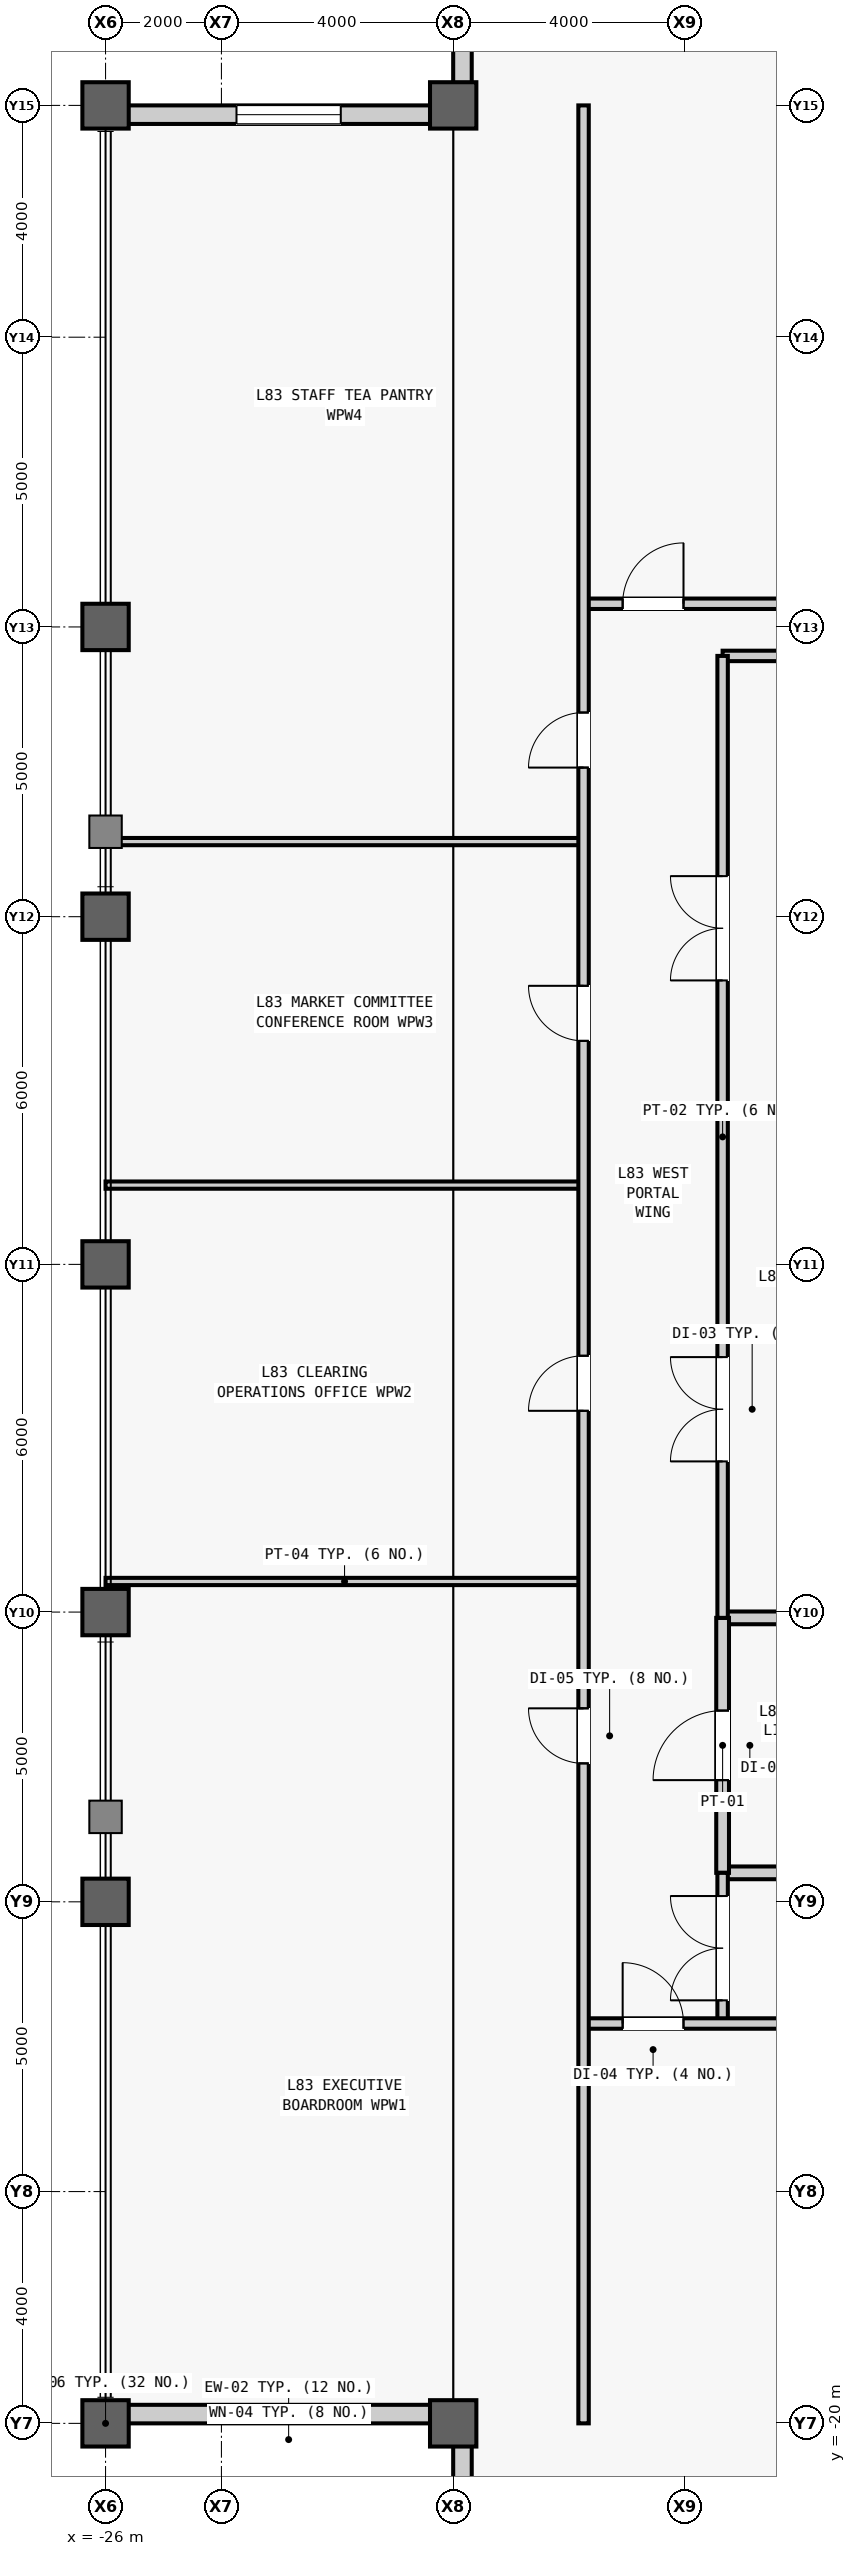
"""IFC4 building model, lengths in metres.
Left out: names, types, materials, properties, quantities, classifications, styles, units other than length and angle.
Written with IfcOpenShell. Run it as: python <this file> out.ifc"""

import sys

from ifc_helpers import new_model, si_unit, direction, frame, frame_2d, origin, origin_2d, place, context, subcontext, project, spatial, rectangle, hollow_rectangle, extrude, source, transform, mapped, element, fill, save


model = new_model("IFC4")
c1 = context("Model", 3, precision=1e-05, world=origin(), true_north=direction((0.0, 1.0)))
c2 = subcontext(c1, "Body", "Model", "MODEL_VIEW")
j1 = project(units=[si_unit("LENGTHUNIT", "METRE"), si_unit("PLANEANGLEUNIT", "RADIAN")], contexts=[c1])
p1 = place(None, origin())
s1 = spatial("IfcSite", under=j1, at=p1, CompositionType="ELEMENT")
p2 = place(p1, origin())
s2 = spatial("IfcBuilding", under=s1, at=p2, CompositionType="ELEMENT")
p3 = place(p2, frame((0.0, 0.0, 350.3)))
s3 = spatial("IfcBuildingStorey", under=s2, at=p3, CompositionType="ELEMENT", Elevation=350.3)
m1 = source(origin(), c2, "Body", "SweptSolid", [
    extrude(hollow_rectangle(XDim=0.8, YDim=0.8, WallThickness=0.045, at=origin_2d()), origin(), (0.0, 0.0, 1.0), 4.0),
])
for number, where, z_axis, x_axis in (
    (1, (-26.0, -20.0, 0.0), (0.0, 0.0, 1.0), (1.0, 0.0, 0.0)),
    (2, (-26.0, -11.0, 0.0), (0.0, 0.0, 1.0), (1.0, 0.0, 0.0)),
    (3, (-26.0, -6.0, 0.0), (0.0, 0.0, 1.0), (1.0, 0.0, 0.0)),
    (4, (-26.0, 0.0, 0.0), (0.0, 0.0, 1.0), (1.0, 0.0, 0.0)),
    (5, (-26.0, 6.0, 0.0), (0.0, 0.0, 1.0), (1.0, 0.0, 0.0)),
    (6, (-26.0, 11.0, 0.0), (0.0, 0.0, 1.0), (1.0, 0.0, 0.0)),
    (7, (-26.0, 20.0, 0.0), (0.0, 0.0, 1.0), (1.0, 0.0, 0.0)),
    (8, (-20.0, -20.0, 0.0), (0.0, 0.0, 1.0), (1.0, 0.0, 0.0)),
    (9, (-20.0, 20.0, 0.0), (0.0, 0.0, 1.0), (1.0, 0.0, 0.0)),
):
    element("IfcColumn", number, at=place(p3, frame(where, z_axis=z_axis, x_axis=x_axis)), inside=s3, PredefinedType="COLUMN", context=c2, shape_type="MappedRepresentation", body=[
        mapped(m1, transform((0.0, 0.0, 0.0), scale=1.0)),
    ])
m2 = source(origin(), c2, "Body", "SweptSolid", [
    extrude(rectangle(XDim=5.68, YDim=0.32, at=frame_2d((2.84, 0.0))), origin(), (0.0, 0.0, 1.0), 3.191),
])
p4 = place(p3, frame((-20.0, -19.84, 0.0), z_axis=(0.0, 0.0, 1.0), x_axis=(-1.0, 0.0, 0.0)))
e10 = element("IfcWall", 10, at=p4, inside=s3, PredefinedType="STANDARD", context=c2, shape_type="MappedRepresentation", body=[
    mapped(m2, transform((0.0, 0.0, 0.0), scale=1.0)),
])
m3 = source(origin(), c2, "Body", "SweptSolid", [
    extrude(rectangle(XDim=1.8, YDim=2.4, at=frame_2d((0.9, 1.2))), frame((0.0, 0.17, 0.0), z_axis=(0.0, -1.0, 0.0), x_axis=(1.0, 0.0, 0.0)), (0.0, 0.0, 1.0), 0.34),
])
p5 = place(p4, frame((1.94, 0.0, 0.5)))
e11 = element("IfcOpeningElement", 11, at=p5, cuts=e10, PredefinedType="OPENING", context=c2, shape_type="MappedRepresentation", body=[
    mapped(m3, transform((0.0, 0.0, 0.0), scale=1.0)),
])
p6 = place(p3, frame((-19.84, -25.68, 0.0), z_axis=(0.0, 0.0, 1.0), x_axis=(0.0, 1.0, 0.0)))
e12 = element("IfcWall", 12, at=p6, inside=s3, PredefinedType="STANDARD", context=c2, shape_type="MappedRepresentation", body=[
    mapped(m2, transform((0.0, 0.0, 0.0), scale=1.0)),
])
p7 = place(p6, frame((1.94, 0.0, 0.5)))
e13 = element("IfcOpeningElement", 13, at=p7, cuts=e12, PredefinedType="OPENING", context=c2, shape_type="MappedRepresentation", body=[
    mapped(m3, transform((0.0, 0.0, 0.0), scale=1.0)),
])
p8 = place(p3, frame((-19.84, 20.0, 0.0), z_axis=(0.0, 0.0, 1.0), x_axis=(0.0, 1.0, 0.0)))
e14 = element("IfcWall", 14, at=p8, inside=s3, PredefinedType="STANDARD", context=c2, shape_type="MappedRepresentation", body=[
    mapped(m2, transform((0.0, 0.0, 0.0), scale=1.0)),
])
p9 = place(p8, frame((1.94, 0.0, 0.5)))
e15 = element("IfcOpeningElement", 15, at=p9, cuts=e14, PredefinedType="OPENING", context=c2, shape_type="MappedRepresentation", body=[
    mapped(m3, transform((0.0, 0.0, 0.0), scale=1.0)),
])
p10 = place(p3, frame((-20.0, 19.84, 0.0), z_axis=(0.0, 0.0, 1.0), x_axis=(-1.0, 0.0, 0.0)))
e16 = element("IfcWall", 16, at=p10, inside=s3, PredefinedType="STANDARD", context=c2, shape_type="MappedRepresentation", body=[
    mapped(m2, transform((0.0, 0.0, 0.0), scale=1.0)),
])
p11 = place(p10, frame((1.94, 0.0, 0.5)))
e17 = element("IfcOpeningElement", 17, at=p11, cuts=e16, PredefinedType="OPENING", context=c2, shape_type="MappedRepresentation", body=[
    mapped(m3, transform((0.0, 0.0, 0.0), scale=1.0)),
])
m4 = source(origin(), c2, "Body", "SweptSolid", [
    extrude(rectangle(XDim=4.05, YDim=0.22, at=frame_2d((2.025, 0.0))), origin(), (0.0, 0.0, 1.0), 3.74),
])
p12 = place(p3, frame((-15.35, -10.5, 0.0), z_axis=(0.0, 0.0, 1.0), x_axis=(1.0, 0.0, 0.0)))
e18 = element("IfcWall", 18, at=p12, inside=s3, PredefinedType="PARTITIONING", context=c2, shape_type="MappedRepresentation", body=[
    mapped(m4, transform((0.0, 0.0, 0.0), scale=1.0)),
])
m5 = source(origin(), c2, "Body", "SweptSolid", [
    extrude(rectangle(XDim=4.05, YDim=0.22, at=frame_2d((2.025, 0.0))), origin(), (0.0, 0.0, 1.0), 3.124),
])
p13 = place(p3, frame((-15.35, -6.1, 0.0), z_axis=(0.0, 0.0, 1.0), x_axis=(1.0, 0.0, 0.0)))
e19 = element("IfcWall", 19, at=p13, inside=s3, PredefinedType="PARTITIONING", context=c2, shape_type="MappedRepresentation", body=[
    mapped(m5, transform((0.0, 0.0, 0.0), scale=1.0)),
])
m6 = source(origin(), c2, "Body", "SweptSolid", [
    extrude(rectangle(XDim=4.4, YDim=0.22, at=frame_2d((2.2, 0.0))), origin(), (0.0, 0.0, 1.0), 3.74),
])
p14 = place(p3, frame((-15.35, -10.5, 0.0), z_axis=(0.0, 0.0, 1.0), x_axis=(0.0, 1.0, 0.0)))
e20 = element("IfcWall", 20, at=p14, inside=s3, PredefinedType="PARTITIONING", context=c2, shape_type="MappedRepresentation", body=[
    mapped(m6, transform((0.0, 0.0, 0.0), scale=1.0)),
])
m7 = source(origin(), c2, "Body", "SweptSolid", [
    extrude(rectangle(XDim=1.2, YDim=2.2, at=frame_2d((0.6, 1.1))), frame((0.0, 0.12, 0.0), z_axis=(0.0, -1.0, 0.0), x_axis=(1.0, 0.0, 0.0)), (0.0, 0.0, 1.0), 0.24),
])
p15 = place(p14, frame((1.6, 0.0, 0.0)))
e21 = element("IfcOpeningElement", 21, at=p15, cuts=e20, PredefinedType="OPENING", context=c2, shape_type="MappedRepresentation", body=[
    mapped(m7, transform((0.0, 0.0, 0.0), scale=1.0)),
])
m8 = source(origin(), c2, "Body", "SweptSolid", [
    extrude(rectangle(XDim=4.05, YDim=0.18, at=frame_2d((2.025, 0.0))), origin(), (0.0, 0.0, 1.0), 3.74),
])
p16 = place(p3, frame((-15.35, 10.5, 0.0), z_axis=(0.0, 0.0, 1.0), x_axis=(1.0, 0.0, 0.0)))
e22 = element("IfcWall", 22, at=p16, inside=s3, PredefinedType="PARTITIONING", context=c2, shape_type="MappedRepresentation", body=[
    mapped(m8, transform((0.0, 0.0, 0.0), scale=1.0)),
])
m9 = source(origin(), c2, "Body", "SweptSolid", [
    extrude(rectangle(XDim=16.6, YDim=0.18, at=frame_2d((8.3, 0.0))), origin(), (0.0, 0.0, 1.0), 3.74),
])
p17 = place(p3, frame((-15.35, -6.1, 0.0), z_axis=(0.0, 0.0, 1.0), x_axis=(0.0, 1.0, 0.0)))
e23 = element("IfcWall", 23, at=p17, inside=s3, PredefinedType="PARTITIONING", context=c2, shape_type="MappedRepresentation", body=[
    mapped(m9, transform((0.0, 0.0, 0.0), scale=1.0)),
])
m10 = source(origin(), c2, "Body", "SweptSolid", [
    extrude(rectangle(XDim=1.8, YDim=2.25, at=frame_2d((0.9, 1.125))), frame((0.0, 0.1, 0.0), z_axis=(0.0, -1.0, 0.0), x_axis=(1.0, 0.0, 0.0)), (0.0, 0.0, 1.0), 0.2),
])
p18 = place(p17, frame((2.7, 0.0, 0.0)))
e24 = element("IfcOpeningElement", 24, at=p18, cuts=e23, PredefinedType="OPENING", context=c2, shape_type="MappedRepresentation", body=[
    mapped(m10, transform((0.0, 0.0, 0.0), scale=1.0)),
])
p19 = place(p17, frame((11.0, 0.0, 0.0)))
e25 = element("IfcOpeningElement", 25, at=p19, cuts=e23, PredefinedType="OPENING", context=c2, shape_type="MappedRepresentation", body=[
    mapped(m10, transform((0.0, 0.0, 0.0), scale=1.0)),
])
m11 = source(origin(), c2, "Body", "SweptSolid", [
    extrude(rectangle(XDim=2.6, YDim=0.18, at=frame_2d((1.3, 0.0))), origin(), (0.0, 0.0, 1.0), 3.74),
])
p20 = place(p3, frame((-15.35, -13.1, 0.0), z_axis=(0.0, 0.0, 1.0), x_axis=(0.0, 1.0, 0.0)))
e26 = element("IfcWall", 26, at=p20, inside=s3, PredefinedType="PARTITIONING", context=c2, shape_type="MappedRepresentation", body=[
    mapped(m11, transform((0.0, 0.0, 0.0), scale=1.0)),
])
p21 = place(p20, frame((0.4, 0.0, 0.0)))
e27 = element("IfcOpeningElement", 27, at=p21, cuts=e26, PredefinedType="OPENING", context=c2, shape_type="MappedRepresentation", body=[
    mapped(m10, transform((0.0, 0.0, 0.0), scale=1.0)),
])
m12 = source(origin(), c2, "Body", "SweptSolid", [
    extrude(rectangle(XDim=22.55, YDim=0.18, at=frame_2d((11.275, 0.0))), origin(), (0.0, 0.0, 1.0), 3.74),
])
p22 = place(p3, frame((-17.75, -13.1, 0.0), z_axis=(0.0, 0.0, 1.0), x_axis=(1.0, 0.0, 0.0)))
e28 = element("IfcWall", 28, at=p22, inside=s3, PredefinedType="PARTITIONING", context=c2, shape_type="MappedRepresentation", body=[
    mapped(m12, transform((0.0, 0.0, 0.0), scale=1.0)),
])
m13 = source(origin(), c2, "Body", "SweptSolid", [
    extrude(rectangle(XDim=1.05, YDim=2.2, at=frame_2d((0.525, 1.1))), frame((0.0, 0.1, 0.0), z_axis=(0.0, -1.0, 0.0), x_axis=(1.0, 0.0, 0.0)), (0.0, 0.0, 1.0), 0.2),
])
p23 = place(p22, frame((0.675, 0.0, 0.0)))
e29 = element("IfcOpeningElement", 29, at=p23, cuts=e28, PredefinedType="OPENING", context=c2, shape_type="MappedRepresentation", body=[
    mapped(m13, transform((0.0, 0.0, 0.0), scale=1.0)),
])
m14 = source(origin(), c2, "Body", "SweptSolid", [
    extrude(rectangle(XDim=12.7, YDim=0.18, at=frame_2d((6.35, 0.0))), origin(), (0.0, 0.0, 1.0), 2.79),
])
p24 = place(p3, frame((-17.75, 11.4, 0.0), z_axis=(0.0, 0.0, 1.0), x_axis=(1.0, 0.0, 0.0)))
e30 = element("IfcWall", 30, at=p24, inside=s3, PredefinedType="PARTITIONING", context=c2, shape_type="MappedRepresentation", body=[
    mapped(m14, transform((0.0, 0.0, 0.0), scale=1.0)),
])
p25 = place(p24, frame((0.675, 0.0, 0.0)))
e31 = element("IfcOpeningElement", 31, at=p25, cuts=e30, PredefinedType="OPENING", context=c2, shape_type="MappedRepresentation", body=[
    mapped(m13, transform((0.0, 0.0, 0.0), scale=1.0)),
])
m15 = source(origin(), c2, "Body", "SweptSolid", [
    extrude(rectangle(XDim=8.25, YDim=0.125, at=frame_2d((4.125, 0.0))), origin(), (0.0, 0.0, 1.0), 3.74),
])
for number, where, z_axis, x_axis in (
    (32, (-26.0, -5.472, 0.0), (0.0, 0.0, 1.0), (1.0, 0.0, 0.0)),
    (33, (-26.0, 1.368, 0.0), (0.0, 0.0, 1.0), (1.0, 0.0, 0.0)),
    (34, (-26.0, 7.296, 0.0), (0.0, 0.0, 1.0), (1.0, 0.0, 0.0)),
):
    element("IfcWall", number, at=place(p3, frame(where, z_axis=z_axis, x_axis=x_axis)), inside=s3, PredefinedType="PARTITIONING", context=c2, shape_type="MappedRepresentation", body=[
        mapped(m15, transform((0.0, 0.0, 0.0), scale=1.0)),
    ])
m16 = source(origin(), c2, "Body", "SweptSolid", [
    extrude(rectangle(XDim=40.0, YDim=0.18, at=frame_2d((20.0, 0.0))), origin(), (0.0, 0.0, 1.0), 3.74),
])
p26 = place(p3, frame((-17.75, -20.0, 0.0), z_axis=(0.0, 0.0, 1.0), x_axis=(0.0, 1.0, 0.0)))
e35 = element("IfcWall", 35, at=p26, inside=s3, PredefinedType="PARTITIONING", context=c2, shape_type="MappedRepresentation", body=[
    mapped(m16, transform((0.0, 0.0, 0.0), scale=1.0)),
])
m17 = source(origin(), c2, "Body", "SweptSolid", [
    extrude(rectangle(XDim=0.95, YDim=2.15, at=frame_2d((0.475, 1.075))), frame((0.0, 0.1, 0.0), z_axis=(0.0, -1.0, 0.0), x_axis=(1.0, 0.0, 0.0)), (0.0, 0.0, 1.0), 0.2),
])
p27 = place(p26, frame((11.389, 0.0, 0.0)))
e36 = element("IfcOpeningElement", 36, at=p27, cuts=e35, PredefinedType="OPENING", context=c2, shape_type="MappedRepresentation", body=[
    mapped(m17, transform((0.0, 0.0, 0.0), scale=1.0)),
])
p28 = place(p26, frame((17.473, 0.0, 0.0)))
e37 = element("IfcOpeningElement", 37, at=p28, cuts=e35, PredefinedType="OPENING", context=c2, shape_type="MappedRepresentation", body=[
    mapped(m17, transform((0.0, 0.0, 0.0), scale=1.0)),
])
p29 = place(p26, frame((23.857, 0.0, 0.0)))
e38 = element("IfcOpeningElement", 38, at=p29, cuts=e35, PredefinedType="OPENING", context=c2, shape_type="MappedRepresentation", body=[
    mapped(m17, transform((0.0, 0.0, 0.0), scale=1.0)),
])
p30 = place(p26, frame((28.573, 0.0, 0.0)))
e39 = element("IfcOpeningElement", 39, at=p30, cuts=e35, PredefinedType="OPENING", context=c2, shape_type="MappedRepresentation", body=[
    mapped(m17, transform((0.0, 0.0, 0.0), scale=1.0)),
])
m18 = source(origin(), c2, "Body", "SweptSolid", [
    extrude(rectangle(XDim=1.8, YDim=2.4, at=frame_2d((0.9, 1.2))), frame((0.0, 0.03, 0.0), z_axis=(0.0, -1.0, 0.0), x_axis=(1.0, 0.0, 0.0)), (0.0, 0.0, 1.0), 0.06),
])
p31 = place(p5, origin())
e40 = element("IfcWindow", 40, at=p31, inside=s3, PartitioningType="SINGLE_PANEL", PredefinedType="WINDOW", context=c2, shape_type="MappedRepresentation", body=[
    mapped(m18, transform((0.0, 0.0, 0.0), scale=1.0)),
])
fill(e11, e40)
p32 = place(p11, origin())
e41 = element("IfcWindow", 41, at=p32, inside=s3, PartitioningType="SINGLE_PANEL", PredefinedType="WINDOW", context=c2, shape_type="MappedRepresentation", body=[
    mapped(m18, transform((0.0, 0.0, 0.0), scale=1.0)),
])
fill(e17, e41)
m19 = source(origin(), c2, "Body", "SweptSolid", [
    extrude(rectangle(XDim=1.2, YDim=2.2, at=frame_2d((0.6, 1.1))), frame((0.0, 0.025, 0.0), z_axis=(0.0, -1.0, 0.0), x_axis=(1.0, 0.0, 0.0)), (0.0, 0.0, 1.0), 0.05),
])
p33 = place(p15, origin())
e42 = element("IfcDoor", 42, at=p33, inside=s3, OperationType="SINGLE_SWING_LEFT", PredefinedType="DOOR", context=c2, shape_type="MappedRepresentation", body=[
    mapped(m19, transform((0.0, 0.0, 0.0), scale=1.0)),
])
fill(e21, e42)
m20 = source(origin(), c2, "Body", "SweptSolid", [
    extrude(rectangle(XDim=1.8, YDim=2.25, at=frame_2d((0.9, 1.125))), frame((0.0, 0.025, 0.0), z_axis=(0.0, -1.0, 0.0), x_axis=(1.0, 0.0, 0.0)), (0.0, 0.0, 1.0), 0.05),
])
p34 = place(p18, origin())
e43 = element("IfcDoor", 43, at=p34, inside=s3, OperationType="SINGLE_SWING_LEFT", PredefinedType="DOOR", context=c2, shape_type="MappedRepresentation", body=[
    mapped(m20, transform((0.0, 0.0, 0.0), scale=1.0)),
])
fill(e24, e43)
p35 = place(p19, origin())
e44 = element("IfcDoor", 44, at=p35, inside=s3, OperationType="SINGLE_SWING_RIGHT", PredefinedType="DOOR", context=c2, shape_type="MappedRepresentation", body=[
    mapped(m20, transform((0.0, 0.0, 0.0), scale=1.0)),
])
fill(e25, e44)
p36 = place(p21, origin())
e45 = element("IfcDoor", 45, at=p36, inside=s3, OperationType="DOUBLE_DOOR_SINGLE_SWING", PredefinedType="DOOR", context=c2, shape_type="MappedRepresentation", body=[
    mapped(m20, transform((0.0, 0.0, 0.0), scale=1.0)),
])
fill(e27, e45)
m21 = source(origin(), c2, "Body", "SweptSolid", [
    extrude(rectangle(XDim=1.05, YDim=2.2, at=frame_2d((0.525, 1.1))), frame((0.0, 0.025, 0.0), z_axis=(0.0, -1.0, 0.0), x_axis=(1.0, 0.0, 0.0)), (0.0, 0.0, 1.0), 0.05),
])
p37 = place(p23, origin())
e46 = element("IfcDoor", 46, at=p37, inside=s3, OperationType="SINGLE_SWING_LEFT", PredefinedType="DOOR", context=c2, shape_type="MappedRepresentation", body=[
    mapped(m21, transform((0.0, 0.0, 0.0), scale=1.0)),
])
fill(e29, e46)
p38 = place(p25, origin())
e47 = element("IfcDoor", 47, at=p38, inside=s3, OperationType="SINGLE_SWING_RIGHT", PredefinedType="DOOR", context=c2, shape_type="MappedRepresentation", body=[
    mapped(m21, transform((0.0, 0.0, 0.0), scale=1.0)),
])
fill(e31, e47)
m22 = source(origin(), c2, "Body", "SweptSolid", [
    extrude(rectangle(XDim=0.95, YDim=2.15, at=frame_2d((0.475, 1.075))), frame((0.0, 0.025, 0.0), z_axis=(0.0, -1.0, 0.0), x_axis=(1.0, 0.0, 0.0)), (0.0, 0.0, 1.0), 0.05),
])
p39 = place(p27, origin())
e48 = element("IfcDoor", 48, at=p39, inside=s3, OperationType="SINGLE_SWING_RIGHT", PredefinedType="DOOR", context=c2, shape_type="MappedRepresentation", body=[
    mapped(m22, transform((0.0, 0.0, 0.0), scale=1.0)),
])
fill(e36, e48)
p40 = place(p28, origin())
e49 = element("IfcDoor", 49, at=p40, inside=s3, OperationType="SINGLE_SWING_LEFT", PredefinedType="DOOR", context=c2, shape_type="MappedRepresentation", body=[
    mapped(m22, transform((0.0, 0.0, 0.0), scale=1.0)),
])
fill(e37, e49)
p41 = place(p29, origin())
e50 = element("IfcDoor", 50, at=p41, inside=s3, OperationType="SINGLE_SWING_RIGHT", PredefinedType="DOOR", context=c2, shape_type="MappedRepresentation", body=[
    mapped(m22, transform((0.0, 0.0, 0.0), scale=1.0)),
])
fill(e38, e50)
p42 = place(p30, origin())
e51 = element("IfcDoor", 51, at=p42, inside=s3, OperationType="SINGLE_SWING_LEFT", PredefinedType="DOOR", context=c2, shape_type="MappedRepresentation", body=[
    mapped(m22, transform((0.0, 0.0, 0.0), scale=1.0)),
])
fill(e39, e51)
save(model, sys.argv[1])
